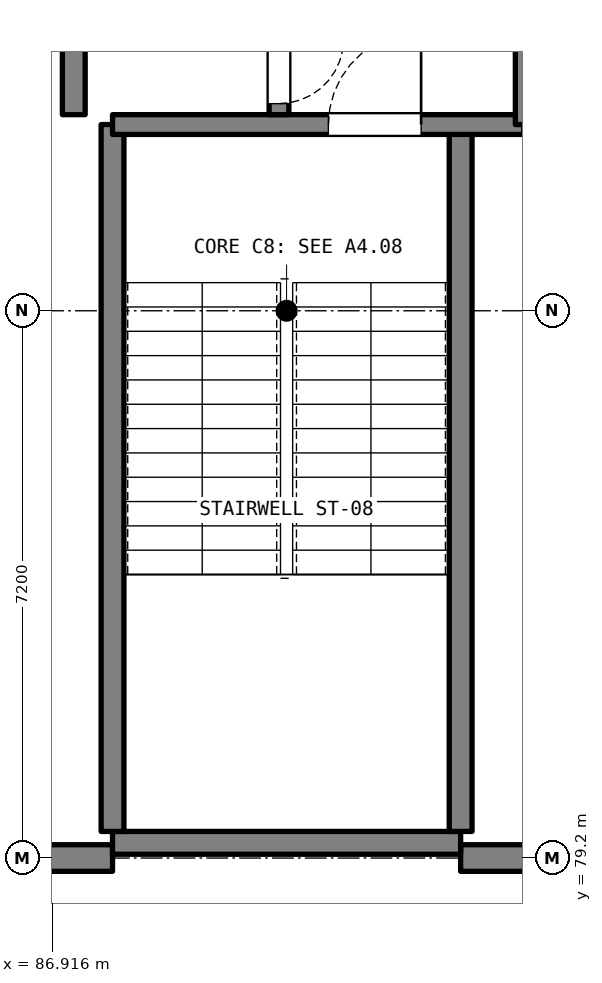
"""IFC4 building model, lengths in metres.
Left out: names, types, materials, properties, quantities, classifications, styles, units other than length and angle.
Written with IfcOpenShell. Run it as: python <this file> out.ifc"""

import sys

from ifc_helpers import new_model, si_unit, direction, frame, frame_2d, origin, place, context, subcontext, project, spatial, rectangle, extrude, element, fill, save


model = new_model("IFC4")
c1 = context("Model", 3, precision=1e-05, world=origin(), true_north=direction((0.0, 1.0)))
c2 = subcontext(c1, "Body", "Model", "MODEL_VIEW")
j1 = project(units=[si_unit("LENGTHUNIT", "METRE"), si_unit("PLANEANGLEUNIT", "RADIAN")], contexts=[c1])
p1 = place(None, origin())
s1 = spatial("IfcSite", under=j1, at=p1, CompositionType="ELEMENT")
p2 = place(p1, origin())
s2 = spatial("IfcBuilding", under=s1, at=p2, CompositionType="ELEMENT")
p3 = place(p2, frame((0.0, 0.0, -4.2)))
s3 = spatial("IfcBuildingStorey", under=s2, at=p3, CompositionType="ELEMENT", Elevation=-4.2)
for number, where, z_axis, x_axis in (
    (1, (86.7, 79.2, 0.0), (0.0, 0.0, 1.0), (1.0, 0.0, 0.0)),
    (2, (92.29, 79.2, 0.0), (0.0, 0.0, 1.0), (1.0, 0.0, 0.0)),
):
    element("IfcWall", number, at=place(p3, frame(where, z_axis=z_axis, x_axis=x_axis)), inside=s3, PredefinedType="USERDEFINED", context=c2, shape_type="SweptSolid", body=[
        extrude(rectangle(XDim=1.01, YDim=0.35, at=frame_2d((0.505, 0.0))), origin(), (0.0, 0.0, 1.0), 3.98),
    ])
p4 = place(p3, frame((87.71, 79.4, 0.0), z_axis=(0.0, 0.0, 1.0), x_axis=(1.0, 0.0, 0.0)))
e3 = element("IfcWall", 3, at=p4, inside=s3, PredefinedType="SHEAR", context=c2, shape_type="SweptSolid", body=[
    extrude(rectangle(XDim=4.58, YDim=0.3, at=frame_2d((2.29, 0.0))), origin(), (0.0, 0.0, 1.0), 3.98),
])
for number, where, z_axis, x_axis in (
    (4, (87.71, 79.55, 0.0), (0.0, 0.0, 1.0), (0.0, 1.0, 0.0)),
    (5, (92.29, 79.55, 0.0), (0.0, 0.0, 1.0), (0.0, 1.0, 0.0)),
):
    element("IfcWall", number, at=place(p3, frame(where, z_axis=z_axis, x_axis=x_axis)), inside=s3, PredefinedType="SHEAR", context=c2, shape_type="SweptSolid", body=[
        extrude(rectangle(XDim=9.3, YDim=0.3, at=frame_2d((4.65, 0.0))), origin(), (0.0, 0.0, 1.0), 3.98),
    ])
p5 = place(p3, frame((87.71, 88.85, 0.0), z_axis=(0.0, 0.0, 1.0), x_axis=(1.0, 0.0, 0.0)))
e6 = element("IfcWall", 6, at=p5, inside=s3, PredefinedType="SHEAR", context=c2, shape_type="SweptSolid", body=[
    extrude(rectangle(XDim=5.41, YDim=0.26, at=frame_2d((2.705, 0.0))), origin(), (0.0, 0.0, 1.0), 3.98),
])
p6 = place(p5, frame((2.84, 0.0, 0.0)))
e7 = element("IfcOpeningElement", 7, at=p6, cuts=e6, PredefinedType="OPENING", context=c2, shape_type="SweptSolid", body=[
    extrude(rectangle(XDim=1.22, YDim=2.15, at=frame_2d((0.61, 1.075))), frame((0.0, 0.14, 0.0), z_axis=(0.0, -1.0, 0.0), x_axis=(1.0, 0.0, 0.0)), (0.0, 0.0, 1.0), 0.28),
])
p7 = place(p3, frame((87.2, 88.98, 0.0), z_axis=(0.0, 0.0, 1.0), x_axis=(0.0, 1.0, 0.0)))
e8 = element("IfcWall", 8, at=p7, inside=s3, PredefinedType="SHEAR", context=c2, shape_type="SweptSolid", body=[
    extrude(rectangle(XDim=4.32, YDim=0.3, at=frame_2d((2.16, 0.0))), origin(), (0.0, 0.0, 1.0), 3.98),
])
p8 = place(p3, frame((89.9, 93.3, 0.0), z_axis=(0.0, 0.0, 1.0), x_axis=(0.0, -1.0, 0.0)))
e9 = element("IfcWall", 9, at=p8, inside=s3, PredefinedType="SHEAR", context=c2, shape_type="SweptSolid", body=[
    extrude(rectangle(XDim=4.32, YDim=0.26, at=frame_2d((2.16, 0.0))), origin(), (0.0, 0.0, 1.0), 3.98),
])
p9 = place(p8, frame((1.0, 0.0, 0.0)))
e10 = element("IfcOpeningElement", 10, at=p9, cuts=e9, PredefinedType="OPENING", context=c2, shape_type="SweptSolid", body=[
    extrude(rectangle(XDim=1.2, YDim=2.15, at=frame_2d((0.6, 1.075))), frame((0.0, 0.14, 0.0), z_axis=(0.0, -1.0, 0.0), x_axis=(1.0, 0.0, 0.0)), (0.0, 0.0, 1.0), 0.28),
])
p10 = place(p8, frame((3.325, 0.0, 0.0)))
e11 = element("IfcOpeningElement", 11, at=p10, cuts=e9, PredefinedType="OPENING", context=c2, shape_type="SweptSolid", body=[
    extrude(rectangle(XDim=0.85, YDim=2.05, at=frame_2d((0.425, 1.025))), frame((0.0, 0.14, 0.0), z_axis=(0.0, -1.0, 0.0), x_axis=(1.0, 0.0, 0.0)), (0.0, 0.0, 1.0), 0.28),
])
p11 = place(p3, frame((93.12, 93.3, 0.0), z_axis=(0.0, 0.0, 1.0), x_axis=(0.0, -1.0, 0.0)))
e12 = element("IfcWall", 12, at=p11, inside=s3, PredefinedType="SHEAR", context=c2, shape_type="SweptSolid", body=[
    extrude(rectangle(XDim=4.45, YDim=0.22, at=frame_2d((2.225, 0.0))), origin(), (0.0, 0.0, 1.0), 3.98),
])
p12 = place(p6, origin())
e13 = element("IfcDoor", 13, at=p12, inside=s3, OperationType="SINGLE_SWING_RIGHT", PredefinedType="DOOR", context=c2, shape_type="SweptSolid", body=[
    extrude(rectangle(XDim=1.22, YDim=2.15, at=frame_2d((0.61, 1.075))), frame((0.0, 0.025, 0.0), z_axis=(0.0, -1.0, 0.0), x_axis=(1.0, 0.0, 0.0)), (0.0, 0.0, 1.0), 0.05),
])
fill(e7, e13)
p13 = place(p10, origin())
e14 = element("IfcDoor", 14, at=p13, inside=s3, OperationType="SINGLE_SWING_LEFT", PredefinedType="DOOR", context=c2, shape_type="SweptSolid", body=[
    extrude(rectangle(XDim=0.85, YDim=2.05, at=frame_2d((0.425, 1.025))), frame((0.0, 0.025, 0.0), z_axis=(0.0, -1.0, 0.0), x_axis=(1.0, 0.0, 0.0)), (0.0, 0.0, 1.0), 0.05),
])
fill(e11, e14)
save(model, sys.argv[1])
